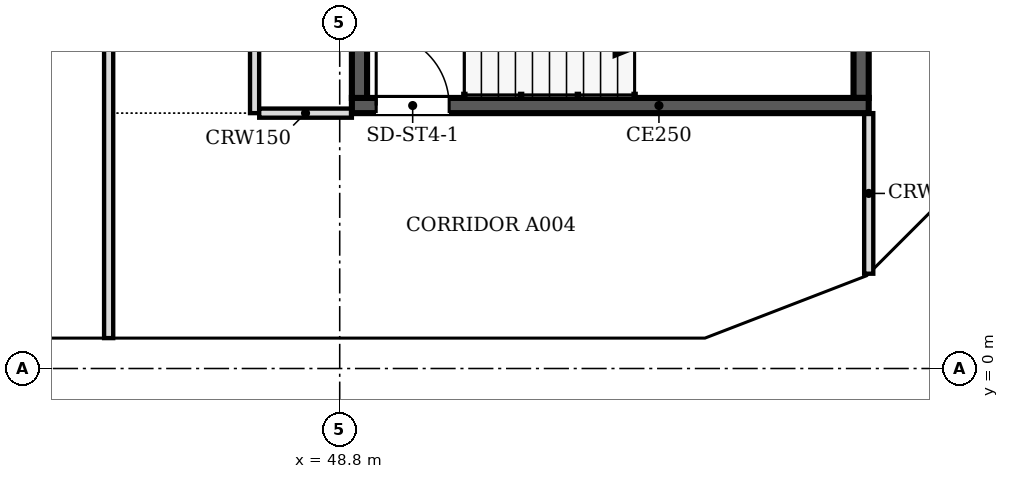
"""IFC4 building model, lengths in metres.
Left out: names, types, materials, properties, quantities, classifications, styles, units other than length and angle.
Written with IfcOpenShell. Run it as: python <this file> out.ifc"""

import sys

from ifc_helpers import new_model, si_unit, direction, frame, frame_2d, origin, place, context, subcontext, project, spatial, polyline, rectangle, outline, extrude, faceted_brep, source, transform, mapped, element, fill, save


model = new_model("IFC4")
c1 = context("Model", 3, precision=1e-05, world=origin(), true_north=direction((0.0, 1.0)))
c2 = subcontext(c1, "Body", "Model", "MODEL_VIEW")
j1 = project(units=[si_unit("LENGTHUNIT", "METRE"), si_unit("PLANEANGLEUNIT", "RADIAN")], contexts=[c1])
p1 = place(None, origin())
s1 = spatial("IfcSite", under=j1, at=p1, CompositionType="ELEMENT")
p2 = place(p1, origin())
s2 = spatial("IfcBuilding", under=s1, at=p2, CompositionType="ELEMENT")
p3 = place(p2, frame((0.0, 0.0, 72.4)))
s3 = spatial("IfcBuildingStorey", under=s2, at=p3, CompositionType="ELEMENT", Elevation=72.4)
m1 = source(origin(), c2, "Body", "SweptSolid", [
    extrude(outline(polyline([(3.05, 0.0), (6.1, 3.8), (3.05, 7.6), (0.0, 3.8), (3.05, 0.0)])), frame((0.0, 0.25, 0.0), z_axis=(0.0, -1.0, 0.0), x_axis=(1.0, 0.0, 0.0)), (0.0, 0.0, 1.0), 0.5),
])
p4 = place(p3, frame((42.7, 0.25, -3.8), z_axis=(0.0, 0.0, 1.0), x_axis=(1.0, 0.0, 0.0)))
e1 = element("IfcWall", 1, at=p4, inside=s3, PredefinedType="SOLIDWALL", context=c2, shape_type="MappedRepresentation", body=[
    mapped(m1, transform((0.0, 0.0, 0.0), scale=1.0)),
])
m2 = source(origin(), c2, "Body", "SweptSolid", [
    extrude(outline(polyline([(3.05, 0.399), (5.78, 3.8), (3.05, 7.2), (0.321, 3.8), (3.05, 0.399)])), frame((0.0, 0.26, 0.0), z_axis=(0.0, -1.0, 0.0), x_axis=(1.0, 0.0, 0.0)), (0.0, 0.0, 1.0), 0.52),
])
p5 = place(p4, origin())
e2 = element("IfcOpeningElement", 2, at=p5, cuts=e1, PredefinedType="OPENING", context=c2, shape_type="MappedRepresentation", body=[
    mapped(m2, transform((0.0, 0.0, 0.0), scale=1.0)),
])
m3 = source(origin(), c2, "Body", "Brep", [
    faceted_brep([(3.05, -0.25, 0.0), (6.053, -0.25, 3.8), (3.05, -0.25, 7.6), (0.0, -0.25, 3.8), (0.0, 0.25, 3.8), (3.05, 0.25, 7.6), (6.007, 0.25, 3.859), (6.007, 0.25, 3.741), (3.05, 0.25, 0.0), (6.053, 0.0, 3.8)], [[[0, 1, 2, 3]], [[4, 5, 6, 7, 8]], [[8, 7, 9, 1, 0]], [[6, 5, 2, 1, 9]], [[5, 4, 3, 2]], [[4, 8, 0, 3]], [[9, 7, 6]]]),
])
p6 = place(p3, frame((48.8, 0.25, -3.8), z_axis=(0.0, 0.0, 1.0), x_axis=(1.0, 0.0, 0.0)))
e3 = element("IfcWall", 3, at=p6, inside=s3, PredefinedType="SOLIDWALL", context=c2, shape_type="MappedRepresentation", body=[
    mapped(m3, transform((0.0, 0.0, 0.0), scale=1.0)),
])
m4 = source(origin(), c2, "Body", "SweptSolid", [
    extrude(outline(polyline([(3.049, 0.401), (5.735, 3.8), (3.049, 7.199), (0.321, 3.8), (3.049, 0.401)])), frame((0.0, 0.26, 0.0), z_axis=(0.0, -1.0, 0.0), x_axis=(1.0, 0.0, 0.0)), (0.0, 0.0, 1.0), 0.52),
])
p7 = place(p6, origin())
e4 = element("IfcOpeningElement", 4, at=p7, cuts=e3, PredefinedType="OPENING", context=c2, shape_type="MappedRepresentation", body=[
    mapped(m4, transform((0.0, 0.0, 0.0), scale=1.0)),
])
m5 = source(origin(), c2, "Body", "Brep", [
    faceted_brep([(2.95, -0.25, 0.0), (3.003, -0.25, 0.068), (3.003, -0.25, 7.531), (2.95, -0.25, 7.6), (0.0, -0.25, 3.8), (0.047, 0.25, 3.86), (2.898, 0.25, 7.532), (2.898, 0.25, 0.068), (0.047, 0.25, 3.74), (2.95, 0.0, 0.0), (2.95, 0.0, 7.6), (0.0, 0.0, 3.8)], [[[0, 1, 2, 3, 4]], [[5, 6, 7, 8]], [[1, 0, 9]], [[10, 3, 2]], [[6, 5, 11, 4, 3, 10]], [[8, 7, 9, 0, 4, 11]], [[8, 11, 5]], [[1, 9, 7, 6, 10, 2]]]),
])
p8 = place(p3, frame((54.854, 0.25, -3.8), z_axis=(0.0, 0.0, 1.0), x_axis=(0.932970071518, 0.359953949349, 0.0)))
e5 = element("IfcWall", 5, at=p8, inside=s3, PredefinedType="SOLIDWALL", context=c2, shape_type="MappedRepresentation", body=[
    mapped(m5, transform((0.0, 0.0, 0.0), scale=1.0)),
])
m6 = source(origin(), c2, "Body", "SweptSolid", [
    extrude(outline(polyline([(2.75, 6.935), (0.316, 3.8), (2.75, 0.665), (2.75, 6.935)])), frame((0.0, 0.26, 0.0), z_axis=(0.0, -1.0, 0.0), x_axis=(1.0, 0.0, 0.0)), (0.0, 0.0, 1.0), 0.52),
])
p9 = place(p8, origin())
e6 = element("IfcOpeningElement", 6, at=p9, cuts=e5, PredefinedType="OPENING", context=c2, shape_type="MappedRepresentation", body=[
    mapped(m6, transform((0.0, 0.0, 0.0), scale=1.0)),
])
m7 = source(origin(), c2, "Body", "Brep", [
    faceted_brep([(0.053, -0.25, 0.0), (2.997, -0.25, 3.8), (0.053, -0.25, 7.6), (0.0, -0.25, 7.532), (0.0, -0.25, 0.068), (0.106, 0.25, 7.531), (2.944, 0.25, 3.868), (2.944, 0.25, 3.732), (0.106, 0.25, 0.068), (2.997, 0.0, 3.8), (0.053, 0.0, 0.0), (0.053, 0.0, 7.6)], [[[0, 1, 2, 3, 4]], [[5, 6, 7, 8]], [[8, 7, 9, 1, 0, 10]], [[6, 5, 11, 2, 1, 9]], [[3, 2, 11]], [[10, 0, 4]], [[8, 10, 4, 3, 11, 5]], [[9, 7, 6]]]),
])
p10 = place(p3, frame((57.569, 1.274, -3.8), z_axis=(0.0, 0.0, 1.0), x_axis=(0.707066050402, 0.707147509625, 0.0)))
e7 = element("IfcWall", 7, at=p10, inside=s3, PredefinedType="SOLIDWALL", context=c2, shape_type="MappedRepresentation", body=[
    mapped(m7, transform((0.0, 0.0, 0.0), scale=1.0)),
])
m8 = source(origin(), c2, "Body", "SweptSolid", [
    extrude(outline(polyline([(0.253, 0.666), (2.681, 3.8), (0.253, 6.934), (0.253, 0.666)])), frame((0.0, 0.26, 0.0), z_axis=(0.0, -1.0, 0.0), x_axis=(1.0, 0.0, 0.0)), (0.0, 0.0, 1.0), 0.52),
])
p11 = place(p10, origin())
e8 = element("IfcOpeningElement", 8, at=p11, cuts=e7, PredefinedType="OPENING", context=c2, shape_type="MappedRepresentation", body=[
    mapped(m8, transform((0.0, 0.0, 0.0), scale=1.0)),
])
p12 = place(p2, frame((0.0, 0.0, 76.2)))
s4 = spatial("IfcBuildingStorey", under=s2, at=p12, CompositionType="ELEMENT", Elevation=76.2)
m9 = source(origin(), c2, "Body", "SweptSolid", [
    extrude(outline(polyline([(3.05, 0.0), (6.1, 3.8), (3.05, 7.6), (0.0, 3.8), (3.05, 0.0)])), frame((0.0, 0.25, 0.0), z_axis=(0.0, -1.0, 0.0), x_axis=(1.0, 0.0, 0.0)), (0.0, 0.0, 1.0), 0.5),
])
p13 = place(p12, frame((39.65, 0.25, -3.8), z_axis=(0.0, 0.0, 1.0), x_axis=(1.0, 0.0, 0.0)))
e9 = element("IfcWall", 9, at=p13, inside=s4, PredefinedType="SOLIDWALL", context=c2, shape_type="MappedRepresentation", body=[
    mapped(m9, transform((0.0, 0.0, 0.0), scale=1.0)),
])
m10 = source(origin(), c2, "Body", "SweptSolid", [
    extrude(outline(polyline([(3.05, 0.399), (5.78, 3.8), (3.05, 7.201), (0.321, 3.8), (3.05, 0.399)])), frame((0.0, 0.26, 0.0), z_axis=(0.0, -1.0, 0.0), x_axis=(1.0, 0.0, 0.0)), (0.0, 0.0, 1.0), 0.52),
])
p14 = place(p13, origin())
e10 = element("IfcOpeningElement", 10, at=p14, cuts=e9, PredefinedType="OPENING", context=c2, shape_type="MappedRepresentation", body=[
    mapped(m10, transform((0.0, 0.0, 0.0), scale=1.0)),
])
p15 = place(p12, frame((45.75, 0.25, -3.8), z_axis=(0.0, 0.0, 1.0), x_axis=(1.0, 0.0, 0.0)))
e11 = element("IfcWall", 11, at=p15, inside=s4, PredefinedType="SOLIDWALL", context=c2, shape_type="MappedRepresentation", body=[
    mapped(m9, transform((0.0, 0.0, 0.0), scale=1.0)),
])
p16 = place(p15, origin())
e12 = element("IfcOpeningElement", 12, at=p16, cuts=e11, PredefinedType="OPENING", context=c2, shape_type="MappedRepresentation", body=[
    mapped(m10, transform((0.0, 0.0, 0.0), scale=1.0)),
])
m11 = source(origin(), c2, "Body", "Brep", [
    faceted_brep([(3.003, -0.25, 0.0), (3.05, -0.25, 0.06), (3.05, -0.25, 7.54), (3.003, -0.25, 7.6), (0.0, -0.25, 3.8), (0.0, 0.25, 3.8), (2.957, 0.25, 7.541), (2.957, 0.25, 0.059), (3.003, 0.0, 0.0), (3.003, 0.0, 7.6)], [[[0, 1, 2, 3, 4]], [[5, 6, 7]], [[1, 0, 8]], [[9, 3, 2]], [[6, 5, 4, 3, 9]], [[5, 7, 8, 0, 4]], [[1, 8, 7, 6, 9, 2]]]),
])
p17 = place(p12, frame((51.85, 0.25, -3.8), z_axis=(0.0, 0.0, 1.0), x_axis=(1.0, 0.0, 0.0)))
e13 = element("IfcWall", 13, at=p17, inside=s4, PredefinedType="SOLIDWALL", context=c2, shape_type="MappedRepresentation", body=[
    mapped(m11, transform((0.0, 0.0, 0.0), scale=1.0)),
])
m12 = source(origin(), c2, "Body", "SweptSolid", [
    extrude(outline(polyline([(2.803, 6.944), (0.319, 3.8), (2.803, 0.656), (2.803, 6.944)])), frame((0.0, 0.26, 0.0), z_axis=(0.0, -1.0, 0.0), x_axis=(1.0, 0.0, 0.0)), (0.0, 0.0, 1.0), 0.52),
])
p18 = place(p17, origin())
e14 = element("IfcOpeningElement", 14, at=p18, cuts=e13, PredefinedType="OPENING", context=c2, shape_type="MappedRepresentation", body=[
    mapped(m12, transform((0.0, 0.0, 0.0), scale=1.0)),
])
m13 = source(origin(), c2, "Body", "Brep", [
    faceted_brep([(0.047, -0.25, 0.0), (2.997, -0.25, 3.8), (0.047, -0.25, 7.6), (0.0, -0.25, 7.541), (0.0, -0.25, 0.059), (0.093, 0.25, 7.54), (2.944, 0.25, 3.868), (2.944, 0.25, 3.732), (0.093, 0.25, 0.06), (2.997, 0.0, 3.8), (0.047, 0.0, 0.0), (0.047, 0.0, 7.6)], [[[0, 1, 2, 3, 4]], [[5, 6, 7, 8]], [[8, 7, 9, 1, 0, 10]], [[6, 5, 11, 2, 1, 9]], [[3, 2, 11]], [[10, 0, 4]], [[8, 10, 4, 3, 11, 5]], [[9, 7, 6]]]),
])
p19 = place(p12, frame((54.81, 0.233, -3.8), z_axis=(0.0, 0.0, 1.0), x_axis=(0.932990326376, 0.359901446078, 0.0)))
e15 = element("IfcWall", 15, at=p19, inside=s4, PredefinedType="SOLIDWALL", context=c2, shape_type="MappedRepresentation", body=[
    mapped(m13, transform((0.0, 0.0, 0.0), scale=1.0)),
])
m14 = source(origin(), c2, "Body", "SweptSolid", [
    extrude(outline(polyline([(0.247, 0.665), (2.681, 3.8), (0.247, 6.935), (0.247, 0.665)])), frame((0.0, 0.26, 0.0), z_axis=(0.0, -1.0, 0.0), x_axis=(1.0, 0.0, 0.0)), (0.0, 0.0, 1.0), 0.52),
])
p20 = place(p19, origin())
e16 = element("IfcOpeningElement", 16, at=p20, cuts=e15, PredefinedType="OPENING", context=c2, shape_type="MappedRepresentation", body=[
    mapped(m14, transform((0.0, 0.0, 0.0), scale=1.0)),
])
m15 = source(origin(), c2, "Body", "Brep", [
    faceted_brep([(2.944, -0.25, 0.0), (2.997, -0.25, 0.068), (2.997, -0.25, 7.532), (2.944, -0.25, 7.6), (0.0, -0.25, 3.8), (0.053, 0.25, 3.868), (2.891, 0.25, 7.532), (2.891, 0.25, 0.068), (0.053, 0.25, 3.732), (2.944, 0.0, 0.0), (2.944, 0.0, 7.6), (0.0, 0.0, 3.8)], [[[0, 1, 2, 3, 4]], [[5, 6, 7, 8]], [[1, 0, 9]], [[10, 3, 2]], [[6, 5, 11, 4, 3, 10]], [[8, 7, 9, 0, 4, 11]], [[8, 11, 5]], [[1, 9, 7, 6, 10, 2]]]),
])
p21 = place(p12, frame((57.606, 1.312, -3.8), z_axis=(0.0, 0.0, 1.0), x_axis=(0.707147509625, 0.707066050402, 0.0)))
e17 = element("IfcWall", 17, at=p21, inside=s4, PredefinedType="SOLIDWALL", context=c2, shape_type="MappedRepresentation", body=[
    mapped(m15, transform((0.0, 0.0, 0.0), scale=1.0)),
])
m16 = source(origin(), c2, "Body", "SweptSolid", [
    extrude(outline(polyline([(2.744, 6.934), (0.316, 3.8), (2.744, 0.667), (2.744, 6.934)])), frame((0.0, 0.26, 0.0), z_axis=(0.0, -1.0, 0.0), x_axis=(1.0, 0.0, 0.0)), (0.0, 0.0, 1.0), 0.52),
])
p22 = place(p21, origin())
e18 = element("IfcOpeningElement", 18, at=p22, cuts=e17, PredefinedType="OPENING", context=c2, shape_type="MappedRepresentation", body=[
    mapped(m16, transform((0.0, 0.0, 0.0), scale=1.0)),
])
p23 = place(p3, frame((57.5, 4.325, 0.0), z_axis=(0.0, 0.0, 1.0), x_axis=(-1.0, 0.0, 0.0)))
e19 = element("IfcWall", 19, at=p23, inside=s3, PredefinedType="SOLIDWALL", context=c2, shape_type="SweptSolid", body=[
    extrude(rectangle(XDim=8.5, YDim=0.25, at=frame_2d((4.25, 0.0))), origin(), (0.0, 0.0, 1.0), 3.8),
])
m17 = source(origin(), c2, "Body", "SweptSolid", [
    extrude(rectangle(XDim=1.2, YDim=2.1, at=frame_2d((0.6, 1.05))), frame((0.0, 0.135, 0.0), z_axis=(0.0, -1.0, 0.0), x_axis=(1.0, 0.0, 0.0)), (0.0, 0.0, 1.0), 0.27),
])
p24 = place(p23, frame((6.9, 0.0, 0.0)))
e20 = element("IfcOpeningElement", 20, at=p24, cuts=e19, PredefinedType="OPENING", context=c2, shape_type="MappedRepresentation", body=[
    mapped(m17, transform((0.0, 0.0, 0.0), scale=1.0)),
])
for number, where, z_axis, x_axis in (
    (21, (49.125, 4.45, 0.0), (0.0, 0.0, 1.0), (0.0, 1.0, 0.0)),
    (22, (57.375, 7.85, 0.0), (0.0, 0.0, 1.0), (0.0, -1.0, 0.0)),
):
    element("IfcWall", number, at=place(p3, frame(where, z_axis=z_axis, x_axis=x_axis)), inside=s3, PredefinedType="SOLIDWALL", context=c2, shape_type="SweptSolid", body=[
        extrude(rectangle(XDim=3.4, YDim=0.25, at=frame_2d((1.7, 0.0))), origin(), (0.0, 0.0, 1.0), 3.8),
    ])
p25 = place(p3, frame((45.0, 0.5, 0.0), z_axis=(0.0, 0.0, 1.0), x_axis=(0.0, 1.0, 0.0)))
e23 = element("IfcWall", 23, at=p25, inside=s3, PredefinedType="PARTITIONING", context=c2, shape_type="SweptSolid", body=[
    extrude(rectangle(XDim=21.724, YDim=0.15, at=frame_2d((10.862, 0.0))), origin(), (0.0, 0.0, 1.0), 3.067),
])
m18 = source(origin(), c2, "Body", "SweptSolid", [
    extrude(rectangle(XDim=0.9, YDim=2.1, at=frame_2d((0.45, 1.05))), frame((0.0, 0.085, 0.0), z_axis=(0.0, -1.0, 0.0), x_axis=(1.0, 0.0, 0.0)), (0.0, 0.0, 1.0), 0.17),
])
p26 = place(p25, frame((7.7, 0.0, 0.0)))
e24 = element("IfcOpeningElement", 24, at=p26, cuts=e23, PredefinedType="OPENING", context=c2, shape_type="MappedRepresentation", body=[
    mapped(m18, transform((0.0, 0.0, 0.0), scale=1.0)),
])
m19 = source(origin(), c2, "Body", "SweptSolid", [
    extrude(rectangle(XDim=1.0, YDim=2.1, at=frame_2d((0.5, 1.05))), frame((0.0, 0.085, 0.0), z_axis=(0.0, -1.0, 0.0), x_axis=(1.0, 0.0, 0.0)), (0.0, 0.0, 1.0), 0.17),
])
p27 = place(p25, frame((16.7, 0.0, 0.0)))
e25 = element("IfcOpeningElement", 25, at=p27, cuts=e23, PredefinedType="OPENING", context=c2, shape_type="MappedRepresentation", body=[
    mapped(m19, transform((0.0, 0.0, 0.0), scale=1.0)),
])
p28 = place(p3, frame((57.5, 1.559, 0.0), z_axis=(0.0, 0.0, 1.0), x_axis=(0.0, 1.0, 0.0)))
e26 = element("IfcWall", 26, at=p28, inside=s3, PredefinedType="PARTITIONING", context=c2, shape_type="SweptSolid", body=[
    extrude(rectangle(XDim=2.641, YDim=0.15, at=frame_2d((1.32, 0.0))), origin(), (0.0, 0.0, 1.0), 3.067),
])
p29 = place(p3, frame((47.4, 22.224, 0.0), z_axis=(0.0, 0.0, 1.0), x_axis=(0.0, -1.0, 0.0)))
e27 = element("IfcWall", 27, at=p29, inside=s3, PredefinedType="PARTITIONING", context=c2, shape_type="SweptSolid", body=[
    extrude(rectangle(XDim=18.024, YDim=0.15, at=frame_2d((9.012, 0.0))), origin(), (0.0, 0.0, 1.0), 3.067),
])
p30 = place(p29, frame((2.123, 0.0, 0.0)))
e28 = element("IfcOpeningElement", 28, at=p30, cuts=e27, PredefinedType="OPENING", context=c2, shape_type="MappedRepresentation", body=[
    mapped(m18, transform((0.0, 0.0, 0.0), scale=1.0)),
])
p31 = place(p29, frame((11.124, 0.0, 0.0)))
e29 = element("IfcOpeningElement", 29, at=p31, cuts=e27, PredefinedType="OPENING", context=c2, shape_type="MappedRepresentation", body=[
    mapped(m18, transform((0.0, 0.0, 0.0), scale=1.0)),
])
p32 = place(p3, frame((47.476, 4.2, 0.0), z_axis=(0.0, 0.0, 1.0), x_axis=(1.0, 0.0, 0.0)))
e30 = element("IfcWall", 30, at=p32, inside=s3, PredefinedType="PARTITIONING", context=c2, shape_type="SweptSolid", body=[
    extrude(rectangle(XDim=1.524, YDim=0.15, at=frame_2d((0.762, 0.0))), origin(), (0.0, 0.0, 1.0), 3.067),
])
m20 = source(origin(), c2, "Body", "SweptSolid", [
    extrude(rectangle(XDim=1.2, YDim=2.1, at=frame_2d((0.6, 1.05))), frame((0.0, 0.025, 0.0), z_axis=(0.0, -1.0, 0.0), x_axis=(1.0, 0.0, 0.0)), (0.0, 0.0, 1.0), 0.05),
])
p33 = place(p24, origin())
e31 = element("IfcDoor", 31, at=p33, inside=s3, OperationType="SINGLE_SWING_RIGHT", PredefinedType="DOOR", context=c2, shape_type="MappedRepresentation", body=[
    mapped(m20, transform((0.0, 0.0, 0.0), scale=1.0)),
])
fill(e20, e31)
save(model, sys.argv[1])
